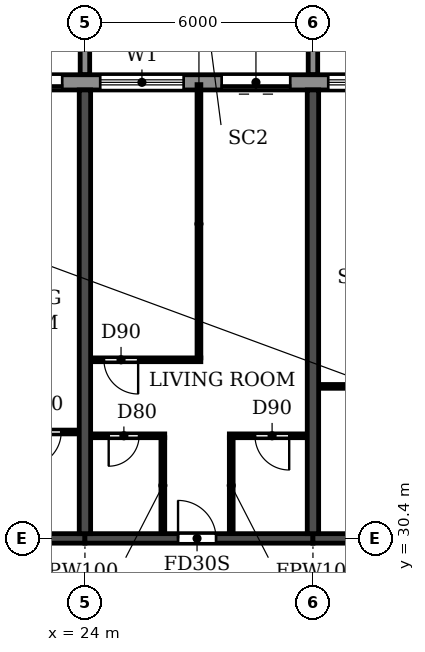
"""IFC4 building model, lengths in metres.
Left out: names, types, materials, properties, quantities, classifications, styles, units other than length and angle.
Written with IfcOpenShell. Run it as: python <this file> out.ifc"""

import sys

from ifc_helpers import new_model, si_unit, direction, frame, frame_2d, origin, place, context, subcontext, project, spatial, polyline, rectangle, outline, extrude, source, transform, mapped, element, fill, save


model = new_model("IFC4")
c1 = context("Model", 3, precision=1e-05, world=origin(), true_north=direction((0.0, 1.0)))
c2 = subcontext(c1, "Body", "Model", "MODEL_VIEW")
j1 = project(units=[si_unit("LENGTHUNIT", "METRE"), si_unit("PLANEANGLEUNIT", "RADIAN")], contexts=[c1])
p1 = place(None, origin())
s1 = spatial("IfcSite", under=j1, at=p1, CompositionType="ELEMENT")
p2 = place(p1, origin())
s2 = spatial("IfcBuilding", under=s1, at=p2, CompositionType="ELEMENT")
p3 = place(p2, frame((0.0, 0.0, 122.4)))
s3 = spatial("IfcBuildingStorey", under=s2, at=p3, CompositionType="ELEMENT", Elevation=122.4)
for number, where, z_axis, x_axis in (
    (1, (24.0, 30.525, 0.0), (0.0, 0.0, 1.0), (0.0, 1.0, 0.0)),
    (2, (30.0, 30.525, 0.0), (0.0, 0.0, 1.0), (0.0, 1.0, 0.0)),
):
    element("IfcWall", number, at=place(p3, frame(where, z_axis=z_axis, x_axis=x_axis)), inside=s3, PredefinedType="SHEAR", context=c2, shape_type="SweptSolid", body=[
        extrude(rectangle(XDim=11.675, YDim=0.3, at=frame_2d((5.837, 0.0))), origin(), (0.0, 0.0, 1.0), 3.07),
    ])
p4 = place(p3, frame((18.0, 30.4, 0.0), z_axis=(0.0, 0.0, 1.0), x_axis=(1.0, 0.0, 0.0)))
e3 = element("IfcWall", 3, at=p4, inside=s3, PredefinedType="SHEAR", context=c2, shape_type="SweptSolid", body=[
    extrude(rectangle(XDim=6.0, YDim=0.25, at=frame_2d((3.0, 0.0))), origin(), (0.0, 0.0, 1.0), 2.47),
])
p5 = place(p4, frame((2.45, 0.0, 0.0)))
e4 = element("IfcOpeningElement", 4, at=p5, cuts=e3, PredefinedType="OPENING", context=c2, shape_type="SweptSolid", body=[
    extrude(rectangle(XDim=1.0, YDim=2.1, at=frame_2d((0.5, 1.05))), frame((0.0, 0.135, 0.0), z_axis=(0.0, -1.0, 0.0), x_axis=(1.0, 0.0, 0.0)), (0.0, 0.0, 1.0), 0.27),
])
p6 = place(p3, frame((24.0, 30.4, 0.0), z_axis=(0.0, 0.0, 1.0), x_axis=(1.0, 0.0, 0.0)))
e5 = element("IfcWall", 5, at=p6, inside=s3, PredefinedType="SHEAR", context=c2, shape_type="SweptSolid", body=[
    extrude(rectangle(XDim=6.0, YDim=0.25, at=frame_2d((3.0, 0.0))), origin(), (0.0, 0.0, 1.0), 2.47),
])
p7 = place(p6, frame((2.45, 0.0, 0.0)))
e6 = element("IfcOpeningElement", 6, at=p7, cuts=e5, PredefinedType="OPENING", context=c2, shape_type="SweptSolid", body=[
    extrude(rectangle(XDim=1.0, YDim=2.1, at=frame_2d((0.5, 1.05))), frame((0.0, 0.135, 0.0), z_axis=(0.0, -1.0, 0.0), x_axis=(1.0, 0.0, 0.0)), (0.0, 0.0, 1.0), 0.27),
])
p8 = place(p3, frame((30.0, 30.4, 0.0), z_axis=(0.0, 0.0, 1.0), x_axis=(1.0, 0.0, 0.0)))
e7 = element("IfcWall", 7, at=p8, inside=s3, PredefinedType="SHEAR", context=c2, shape_type="SweptSolid", body=[
    extrude(rectangle(XDim=6.0, YDim=0.25, at=frame_2d((3.0, 0.0))), origin(), (0.0, 0.0, 1.0), 2.47),
])
p9 = place(p8, frame((2.45, 0.0, 0.0)))
e8 = element("IfcOpeningElement", 8, at=p9, cuts=e7, PredefinedType="OPENING", context=c2, shape_type="SweptSolid", body=[
    extrude(rectangle(XDim=1.0, YDim=2.1, at=frame_2d((0.5, 1.05))), frame((0.0, 0.135, 0.0), z_axis=(0.0, -1.0, 0.0), x_axis=(1.0, 0.0, 0.0)), (0.0, 0.0, 1.0), 0.27),
])
p10 = place(p3, frame((85.317, 42.4, 0.0), z_axis=(0.0, 0.0, 1.0), x_axis=(-1.0, 0.0, 0.0)))
e9 = element("IfcWall", 9, at=p10, inside=s3, PredefinedType="STANDARD", context=c2, shape_type="SweptSolid", body=[
    extrude(rectangle(XDim=68.634, YDim=0.4, at=frame_2d((34.317, 0.0))), origin(), (0.0, 0.0, 1.0), 3.07),
])
p11 = place(p10, frame((64.717, 0.0, 0.9)))
e10 = element("IfcOpeningElement", 10, at=p11, cuts=e9, PredefinedType="OPENING", context=c2, shape_type="SweptSolid", body=[
    extrude(rectangle(XDim=2.2, YDim=1.5, at=frame_2d((1.1, 0.75))), frame((0.0, 0.21, 0.0), z_axis=(0.0, -1.0, 0.0), x_axis=(1.0, 0.0, 0.0)), (0.0, 0.0, 1.0), 0.42),
])
p12 = place(p10, frame((61.917, 0.0, 0.0)))
e11 = element("IfcOpeningElement", 11, at=p12, cuts=e9, PredefinedType="OPENING", context=c2, shape_type="SweptSolid", body=[
    extrude(rectangle(XDim=1.8, YDim=2.4, at=frame_2d((0.9, 1.2))), frame((0.0, 0.21, 0.0), z_axis=(0.0, -1.0, 0.0), x_axis=(1.0, 0.0, 0.0)), (0.0, 0.0, 1.0), 0.42),
])
p13 = place(p10, frame((58.717, 0.0, 0.9)))
e12 = element("IfcOpeningElement", 12, at=p13, cuts=e9, PredefinedType="OPENING", context=c2, shape_type="SweptSolid", body=[
    extrude(rectangle(XDim=2.2, YDim=1.5, at=frame_2d((1.1, 0.75))), frame((0.0, 0.21, 0.0), z_axis=(0.0, -1.0, 0.0), x_axis=(1.0, 0.0, 0.0)), (0.0, 0.0, 1.0), 0.42),
])
p14 = place(p10, frame((55.917, 0.0, 0.0)))
e13 = element("IfcOpeningElement", 13, at=p14, cuts=e9, PredefinedType="OPENING", context=c2, shape_type="SweptSolid", body=[
    extrude(rectangle(XDim=1.8, YDim=2.4, at=frame_2d((0.9, 1.2))), frame((0.0, 0.21, 0.0), z_axis=(0.0, -1.0, 0.0), x_axis=(1.0, 0.0, 0.0)), (0.0, 0.0, 1.0), 0.42),
])
p15 = place(p10, frame((52.717, 0.0, 0.9)))
e14 = element("IfcOpeningElement", 14, at=p15, cuts=e9, PredefinedType="OPENING", context=c2, shape_type="SweptSolid", body=[
    extrude(rectangle(XDim=2.2, YDim=1.5, at=frame_2d((1.1, 0.75))), frame((0.0, 0.21, 0.0), z_axis=(0.0, -1.0, 0.0), x_axis=(1.0, 0.0, 0.0)), (0.0, 0.0, 1.0), 0.42),
])
p16 = place(p10, frame((49.917, 0.0, 0.0)))
e15 = element("IfcOpeningElement", 15, at=p16, cuts=e9, PredefinedType="OPENING", context=c2, shape_type="SweptSolid", body=[
    extrude(rectangle(XDim=1.8, YDim=2.4, at=frame_2d((0.9, 1.2))), frame((0.0, 0.21, 0.0), z_axis=(0.0, -1.0, 0.0), x_axis=(1.0, 0.0, 0.0)), (0.0, 0.0, 1.0), 0.42),
])
p17 = place(p10, frame((46.717, 0.0, 0.9)))
e16 = element("IfcOpeningElement", 16, at=p17, cuts=e9, PredefinedType="OPENING", context=c2, shape_type="SweptSolid", body=[
    extrude(rectangle(XDim=2.2, YDim=1.5, at=frame_2d((1.1, 0.75))), frame((0.0, 0.21, 0.0), z_axis=(0.0, -1.0, 0.0), x_axis=(1.0, 0.0, 0.0)), (0.0, 0.0, 1.0), 0.42),
])
p18 = place(p10, frame((43.917, 0.0, 0.0)))
e17 = element("IfcOpeningElement", 17, at=p18, cuts=e9, PredefinedType="OPENING", context=c2, shape_type="SweptSolid", body=[
    extrude(rectangle(XDim=1.8, YDim=2.4, at=frame_2d((0.9, 1.2))), frame((0.0, 0.21, 0.0), z_axis=(0.0, -1.0, 0.0), x_axis=(1.0, 0.0, 0.0)), (0.0, 0.0, 1.0), 0.42),
])
p19 = place(p10, frame((40.717, 0.0, 0.9)))
e18 = element("IfcOpeningElement", 18, at=p19, cuts=e9, PredefinedType="OPENING", context=c2, shape_type="SweptSolid", body=[
    extrude(rectangle(XDim=2.2, YDim=1.5, at=frame_2d((1.1, 0.75))), frame((0.0, 0.21, 0.0), z_axis=(0.0, -1.0, 0.0), x_axis=(1.0, 0.0, 0.0)), (0.0, 0.0, 1.0), 0.42),
])
p20 = place(p10, frame((37.717, 0.0, 0.9)))
e19 = element("IfcOpeningElement", 19, at=p20, cuts=e9, PredefinedType="OPENING", context=c2, shape_type="SweptSolid", body=[
    extrude(rectangle(XDim=2.2, YDim=1.5, at=frame_2d((1.1, 0.75))), frame((0.0, 0.21, 0.0), z_axis=(0.0, -1.0, 0.0), x_axis=(1.0, 0.0, 0.0)), (0.0, 0.0, 1.0), 0.42),
])
p21 = place(p10, frame((34.917, 0.0, 0.0)))
e20 = element("IfcOpeningElement", 20, at=p21, cuts=e9, PredefinedType="OPENING", context=c2, shape_type="SweptSolid", body=[
    extrude(rectangle(XDim=1.8, YDim=2.4, at=frame_2d((0.9, 1.2))), frame((0.0, 0.21, 0.0), z_axis=(0.0, -1.0, 0.0), x_axis=(1.0, 0.0, 0.0)), (0.0, 0.0, 1.0), 0.42),
])
p22 = place(p10, frame((31.717, 0.0, 0.9)))
e21 = element("IfcOpeningElement", 21, at=p22, cuts=e9, PredefinedType="OPENING", context=c2, shape_type="SweptSolid", body=[
    extrude(rectangle(XDim=2.2, YDim=1.5, at=frame_2d((1.1, 0.75))), frame((0.0, 0.21, 0.0), z_axis=(0.0, -1.0, 0.0), x_axis=(1.0, 0.0, 0.0)), (0.0, 0.0, 1.0), 0.42),
])
p23 = place(p10, frame((28.717, 0.0, 0.9)))
e22 = element("IfcOpeningElement", 22, at=p23, cuts=e9, PredefinedType="OPENING", context=c2, shape_type="SweptSolid", body=[
    extrude(rectangle(XDim=2.2, YDim=1.5, at=frame_2d((1.1, 0.75))), frame((0.0, 0.21, 0.0), z_axis=(0.0, -1.0, 0.0), x_axis=(1.0, 0.0, 0.0)), (0.0, 0.0, 1.0), 0.42),
])
p24 = place(p10, frame((25.717, 0.0, 0.9)))
e23 = element("IfcOpeningElement", 23, at=p24, cuts=e9, PredefinedType="OPENING", context=c2, shape_type="SweptSolid", body=[
    extrude(rectangle(XDim=2.2, YDim=1.5, at=frame_2d((1.1, 0.75))), frame((0.0, 0.21, 0.0), z_axis=(0.0, -1.0, 0.0), x_axis=(1.0, 0.0, 0.0)), (0.0, 0.0, 1.0), 0.42),
])
p25 = place(p10, frame((22.717, 0.0, 0.9)))
e24 = element("IfcOpeningElement", 24, at=p25, cuts=e9, PredefinedType="OPENING", context=c2, shape_type="SweptSolid", body=[
    extrude(rectangle(XDim=2.2, YDim=1.5, at=frame_2d((1.1, 0.75))), frame((0.0, 0.21, 0.0), z_axis=(0.0, -1.0, 0.0), x_axis=(1.0, 0.0, 0.0)), (0.0, 0.0, 1.0), 0.42),
])
p26 = place(p10, frame((19.917, 0.0, 0.0)))
e25 = element("IfcOpeningElement", 25, at=p26, cuts=e9, PredefinedType="OPENING", context=c2, shape_type="SweptSolid", body=[
    extrude(rectangle(XDim=1.8, YDim=2.4, at=frame_2d((0.9, 1.2))), frame((0.0, 0.21, 0.0), z_axis=(0.0, -1.0, 0.0), x_axis=(1.0, 0.0, 0.0)), (0.0, 0.0, 1.0), 0.42),
])
p27 = place(p10, frame((16.917, 0.0, 0.0)))
e26 = element("IfcOpeningElement", 26, at=p27, cuts=e9, PredefinedType="OPENING", context=c2, shape_type="SweptSolid", body=[
    extrude(rectangle(XDim=1.8, YDim=2.4, at=frame_2d((0.9, 1.2))), frame((0.0, 0.21, 0.0), z_axis=(0.0, -1.0, 0.0), x_axis=(1.0, 0.0, 0.0)), (0.0, 0.0, 1.0), 0.42),
])
p28 = place(p10, frame((13.717, 0.0, 0.9)))
e27 = element("IfcOpeningElement", 27, at=p28, cuts=e9, PredefinedType="OPENING", context=c2, shape_type="SweptSolid", body=[
    extrude(rectangle(XDim=2.2, YDim=1.5, at=frame_2d((1.1, 0.75))), frame((0.0, 0.21, 0.0), z_axis=(0.0, -1.0, 0.0), x_axis=(1.0, 0.0, 0.0)), (0.0, 0.0, 1.0), 0.42),
])
p29 = place(p10, frame((10.717, 0.0, 0.9)))
e28 = element("IfcOpeningElement", 28, at=p29, cuts=e9, PredefinedType="OPENING", context=c2, shape_type="SweptSolid", body=[
    extrude(rectangle(XDim=2.2, YDim=1.5, at=frame_2d((1.1, 0.75))), frame((0.0, 0.21, 0.0), z_axis=(0.0, -1.0, 0.0), x_axis=(1.0, 0.0, 0.0)), (0.0, 0.0, 1.0), 0.42),
])
p30 = place(p10, frame((7.717, 0.0, 0.9)))
e29 = element("IfcOpeningElement", 29, at=p30, cuts=e9, PredefinedType="OPENING", context=c2, shape_type="SweptSolid", body=[
    extrude(rectangle(XDim=2.2, YDim=1.5, at=frame_2d((1.1, 0.75))), frame((0.0, 0.21, 0.0), z_axis=(0.0, -1.0, 0.0), x_axis=(1.0, 0.0, 0.0)), (0.0, 0.0, 1.0), 0.42),
])
p31 = place(p10, frame((4.917, 0.0, 0.0)))
e30 = element("IfcOpeningElement", 30, at=p31, cuts=e9, PredefinedType="OPENING", context=c2, shape_type="SweptSolid", body=[
    extrude(rectangle(XDim=1.8, YDim=2.4, at=frame_2d((0.9, 1.2))), frame((0.0, 0.21, 0.0), z_axis=(0.0, -1.0, 0.0), x_axis=(1.0, 0.0, 0.0)), (0.0, 0.0, 1.0), 0.42),
])
p32 = place(p10, frame((1.717, 0.0, 0.9)))
e31 = element("IfcOpeningElement", 31, at=p32, cuts=e9, PredefinedType="OPENING", context=c2, shape_type="SweptSolid", body=[
    extrude(rectangle(XDim=2.2, YDim=1.5, at=frame_2d((1.1, 0.75))), frame((0.0, 0.21, 0.0), z_axis=(0.0, -1.0, 0.0), x_axis=(1.0, 0.0, 0.0)), (0.0, 0.0, 1.0), 0.42),
])
m1 = source(origin(), c2, "Body", "SweptSolid", [
    extrude(outline(polyline([(0.0, 0.0), (0.25, 0.0), (0.25, 3.1), (0.0, 3.1), (0.0, 0.0)])), origin(), (0.0, 0.0, 1.0), 3.1),
])
for number, where in (
    (32, (23.875, 42.6, 0.0)),
    (33, (29.875, 42.6, 0.0)),
):
    element("IfcWall", number, at=place(p3, frame(where)), inside=s3, PredefinedType="STANDARD", context=c2, shape_type="MappedRepresentation", body=[
        mapped(m1, transform((0.0, 0.0, 0.0))),
    ])
p33 = place(p3, frame((24.16, 33.1, 0.0), z_axis=(0.0, 0.0, 1.0), x_axis=(1.0, 0.0, 0.0)))
e34 = element("IfcWall", 34, at=p33, inside=s3, PredefinedType="PARTITIONING", context=c2, shape_type="SweptSolid", body=[
    extrude(rectangle(XDim=1.94, YDim=0.1, at=frame_2d((0.97, 0.0))), origin(), (0.0, 0.0, 1.0), 3.07),
])
p34 = place(p33, frame((0.465, 0.0, 0.0)))
e35 = element("IfcOpeningElement", 35, at=p34, cuts=e34, PredefinedType="OPENING", context=c2, shape_type="SweptSolid", body=[
    extrude(rectangle(XDim=0.8, YDim=2.1, at=frame_2d((0.4, 1.05))), frame((0.0, 0.06, 0.0), z_axis=(0.0, -1.0, 0.0), x_axis=(1.0, 0.0, 0.0)), (0.0, 0.0, 1.0), 0.12),
])
p35 = place(p3, frame((27.8, 33.1, 0.0), z_axis=(0.0, 0.0, 1.0), x_axis=(1.0, 0.0, 0.0)))
e36 = element("IfcWall", 36, at=p35, inside=s3, PredefinedType="PARTITIONING", context=c2, shape_type="SweptSolid", body=[
    extrude(rectangle(XDim=2.04, YDim=0.1, at=frame_2d((1.02, 0.0))), origin(), (0.0, 0.0, 1.0), 3.07),
])
p36 = place(p35, frame((0.675, 0.0, 0.0)))
e37 = element("IfcOpeningElement", 37, at=p36, cuts=e36, PredefinedType="OPENING", context=c2, shape_type="SweptSolid", body=[
    extrude(rectangle(XDim=0.9, YDim=2.1, at=frame_2d((0.45, 1.05))), frame((0.0, 0.06, 0.0), z_axis=(0.0, -1.0, 0.0), x_axis=(1.0, 0.0, 0.0)), (0.0, 0.0, 1.0), 0.12),
])
p37 = place(p3, frame((21.8, 33.2, 0.0), z_axis=(0.0, 0.0, 1.0), x_axis=(1.0, 0.0, 0.0)))
e38 = element("IfcWall", 38, at=p37, inside=s3, PredefinedType="PARTITIONING", context=c2, shape_type="SweptSolid", body=[
    extrude(rectangle(XDim=2.04, YDim=0.1, at=frame_2d((1.02, 0.0))), origin(), (0.0, 0.0, 1.0), 3.07),
])
p38 = place(p37, frame((0.675, 0.0, 0.0)))
e39 = element("IfcOpeningElement", 39, at=p38, cuts=e38, PredefinedType="OPENING", context=c2, shape_type="SweptSolid", body=[
    extrude(rectangle(XDim=0.9, YDim=2.1, at=frame_2d((0.45, 1.05))), frame((0.0, 0.06, 0.0), z_axis=(0.0, -1.0, 0.0), x_axis=(1.0, 0.0, 0.0)), (0.0, 0.0, 1.0), 0.12),
])
p39 = place(p3, frame((30.16, 34.4, 0.0), z_axis=(0.0, 0.0, 1.0), x_axis=(1.0, 0.0, 0.0)))
e40 = element("IfcWall", 40, at=p39, inside=s3, PredefinedType="PARTITIONING", context=c2, shape_type="SweptSolid", body=[
    extrude(rectangle(XDim=1.94, YDim=0.1, at=frame_2d((0.97, 0.0))), origin(), (0.0, 0.0, 1.0), 3.07),
])
p40 = place(p3, frame((24.16, 35.1, 0.0), z_axis=(0.0, 0.0, 1.0), x_axis=(1.0, 0.0, 0.0)))
e41 = element("IfcWall", 41, at=p40, inside=s3, PredefinedType="PARTITIONING", context=c2, shape_type="SweptSolid", body=[
    extrude(rectangle(XDim=2.89, YDim=0.1, at=frame_2d((1.445, 0.0))), origin(), (0.0, 0.0, 1.0), 3.07),
])
p41 = place(p40, frame((0.34, 0.0, 0.0)))
e42 = element("IfcOpeningElement", 42, at=p41, cuts=e41, PredefinedType="OPENING", context=c2, shape_type="SweptSolid", body=[
    extrude(rectangle(XDim=0.9, YDim=2.1, at=frame_2d((0.45, 1.05))), frame((0.0, 0.06, 0.0), z_axis=(0.0, -1.0, 0.0), x_axis=(1.0, 0.0, 0.0)), (0.0, 0.0, 1.0), 0.12),
])
p42 = place(p3, frame((26.05, 30.535, 0.0), z_axis=(0.0, 0.0, 1.0), x_axis=(0.0, 1.0, 0.0)))
e43 = element("IfcWall", 43, at=p42, inside=s3, PredefinedType="PARTITIONING", context=c2, shape_type="SweptSolid", body=[
    extrude(rectangle(XDim=2.515, YDim=0.1, at=frame_2d((1.258, 0.0))), origin(), (0.0, 0.0, 1.0), 3.07),
])
p43 = place(p3, frame((27.0, 35.15, 0.0), z_axis=(0.0, 0.0, 1.0), x_axis=(0.0, 1.0, 0.0)))
e44 = element("IfcWall", 44, at=p43, inside=s3, PredefinedType="PARTITIONING", context=c2, shape_type="SweptSolid", body=[
    extrude(rectangle(XDim=7.19, YDim=0.1, at=frame_2d((3.595, 0.0))), origin(), (0.0, 0.0, 1.0), 3.07),
])
p44 = place(p3, frame((27.85, 30.535, 0.0), z_axis=(0.0, 0.0, 1.0), x_axis=(0.0, 1.0, 0.0)))
e45 = element("IfcWall", 45, at=p44, inside=s3, PredefinedType="PARTITIONING", context=c2, shape_type="SweptSolid", body=[
    extrude(rectangle(XDim=2.515, YDim=0.1, at=frame_2d((1.258, 0.0))), origin(), (0.0, 0.0, 1.0), 3.07),
])
p45 = place(p12, origin())
e46 = element("IfcDoor", 46, at=p45, inside=s3, OperationType="DOUBLE_DOOR_SLIDING", PredefinedType="DOOR", context=c2, shape_type="SweptSolid", body=[
    extrude(rectangle(XDim=1.8, YDim=2.4, at=frame_2d((0.9, 1.2))), frame((0.0, 0.025, 0.0), z_axis=(0.0, -1.0, 0.0), x_axis=(1.0, 0.0, 0.0)), (0.0, 0.0, 1.0), 0.05),
])
fill(e11, e46)
p46 = place(p13, origin())
e47 = element("IfcWindow", 47, at=p46, inside=s3, PartitioningType="DOUBLE_PANEL_HORIZONTAL", PredefinedType="WINDOW", context=c2, shape_type="SweptSolid", body=[
    extrude(rectangle(XDim=2.2, YDim=1.5, at=frame_2d((1.1, 0.75))), frame((0.0, 0.03, 0.0), z_axis=(0.0, -1.0, 0.0), x_axis=(1.0, 0.0, 0.0)), (0.0, 0.0, 1.0), 0.06),
])
fill(e12, e47)
p47 = place(p14, origin())
e48 = element("IfcDoor", 48, at=p47, inside=s3, OperationType="DOUBLE_DOOR_SLIDING", PredefinedType="DOOR", context=c2, shape_type="SweptSolid", body=[
    extrude(rectangle(XDim=1.8, YDim=2.4, at=frame_2d((0.9, 1.2))), frame((0.0, 0.025, 0.0), z_axis=(0.0, -1.0, 0.0), x_axis=(1.0, 0.0, 0.0)), (0.0, 0.0, 1.0), 0.05),
])
fill(e13, e48)
p48 = place(p15, origin())
e49 = element("IfcWindow", 49, at=p48, inside=s3, PartitioningType="DOUBLE_PANEL_HORIZONTAL", PredefinedType="WINDOW", context=c2, shape_type="SweptSolid", body=[
    extrude(rectangle(XDim=2.2, YDim=1.5, at=frame_2d((1.1, 0.75))), frame((0.0, 0.03, 0.0), z_axis=(0.0, -1.0, 0.0), x_axis=(1.0, 0.0, 0.0)), (0.0, 0.0, 1.0), 0.06),
])
fill(e14, e49)
p49 = place(p38, frame((0.9, 0.0, 0.0), z_axis=(0.0, 0.0, 1.0), x_axis=(-1.0, 0.0, 0.0)))
e50 = element("IfcDoor", 50, at=p49, inside=s3, OperationType="SINGLE_SWING_RIGHT", PredefinedType="DOOR", context=c2, shape_type="SweptSolid", body=[
    extrude(rectangle(XDim=0.9, YDim=2.1, at=frame_2d((0.45, 1.05))), frame((0.0, 0.025, 0.0), z_axis=(0.0, -1.0, 0.0), x_axis=(1.0, 0.0, 0.0)), (0.0, 0.0, 1.0), 0.05),
])
fill(e39, e50)
p50 = place(p41, frame((0.9, 0.0, 0.0), z_axis=(0.0, 0.0, 1.0), x_axis=(-1.0, 0.0, 0.0)))
e51 = element("IfcDoor", 51, at=p50, inside=s3, OperationType="SINGLE_SWING_LEFT", PredefinedType="DOOR", context=c2, shape_type="SweptSolid", body=[
    extrude(rectangle(XDim=0.9, YDim=2.1, at=frame_2d((0.45, 1.05))), frame((0.0, 0.025, 0.0), z_axis=(0.0, -1.0, 0.0), x_axis=(1.0, 0.0, 0.0)), (0.0, 0.0, 1.0), 0.05),
])
fill(e42, e51)
p51 = place(p34, frame((0.8, 0.0, 0.0), z_axis=(0.0, 0.0, 1.0), x_axis=(-1.0, 0.0, 0.0)))
e52 = element("IfcDoor", 52, at=p51, inside=s3, OperationType="SINGLE_SWING_RIGHT", PredefinedType="DOOR", context=c2, shape_type="SweptSolid", body=[
    extrude(rectangle(XDim=0.8, YDim=2.1, at=frame_2d((0.4, 1.05))), frame((0.0, 0.025, 0.0), z_axis=(0.0, -1.0, 0.0), x_axis=(1.0, 0.0, 0.0)), (0.0, 0.0, 1.0), 0.05),
])
fill(e35, e52)
p52 = place(p7, origin())
e53 = element("IfcDoor", 53, at=p52, inside=s3, OperationType="SINGLE_SWING_LEFT", PredefinedType="DOOR", context=c2, shape_type="SweptSolid", body=[
    extrude(rectangle(XDim=1.0, YDim=2.1, at=frame_2d((0.5, 1.05))), frame((0.0, 0.025, 0.0), z_axis=(0.0, -1.0, 0.0), x_axis=(1.0, 0.0, 0.0)), (0.0, 0.0, 1.0), 0.05),
])
fill(e6, e53)
p53 = place(p36, frame((0.9, 0.0, 0.0), z_axis=(0.0, 0.0, 1.0), x_axis=(-1.0, 0.0, 0.0)))
e54 = element("IfcDoor", 54, at=p53, inside=s3, OperationType="SINGLE_SWING_LEFT", PredefinedType="DOOR", context=c2, shape_type="SweptSolid", body=[
    extrude(rectangle(XDim=0.9, YDim=2.1, at=frame_2d((0.45, 1.05))), frame((0.0, 0.025, 0.0), z_axis=(0.0, -1.0, 0.0), x_axis=(1.0, 0.0, 0.0)), (0.0, 0.0, 1.0), 0.05),
])
fill(e37, e54)
save(model, sys.argv[1])
